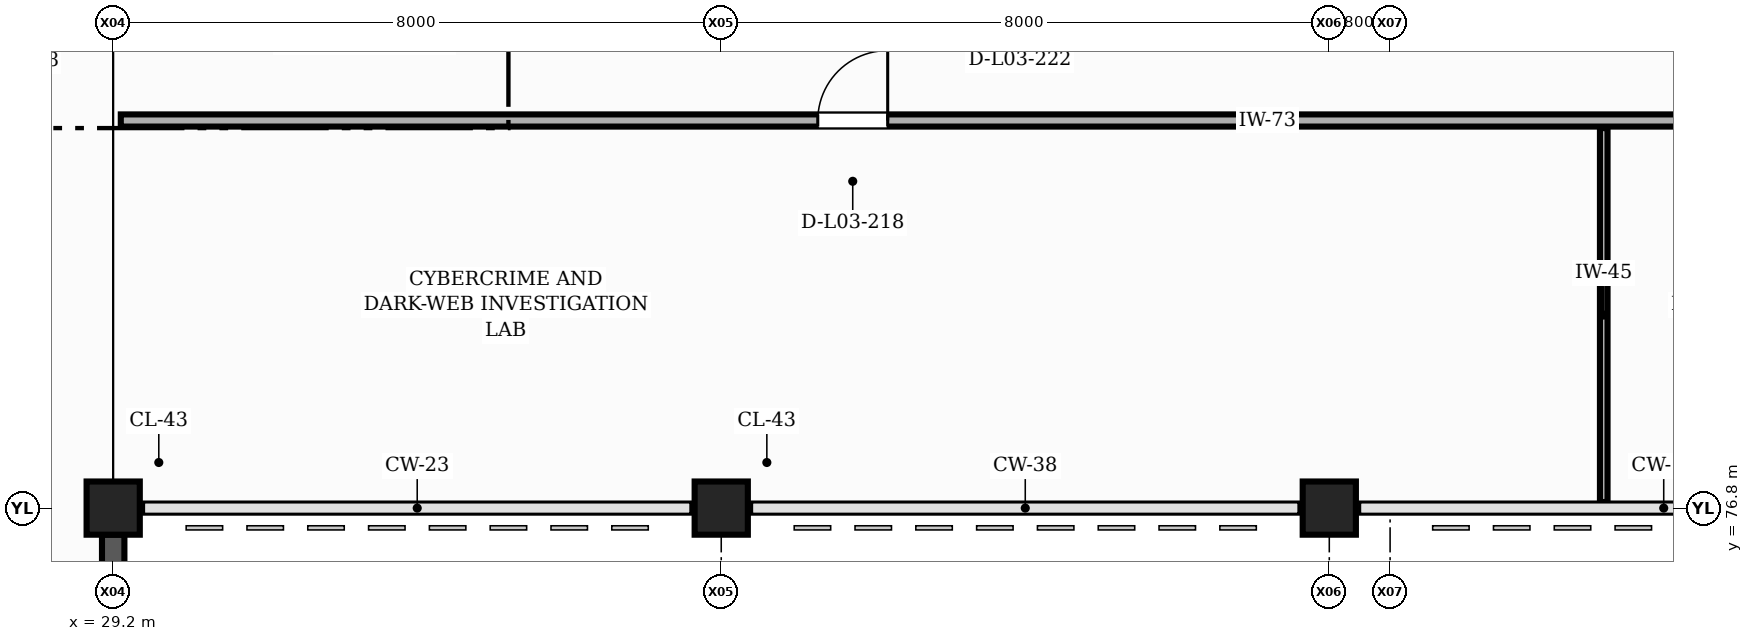
"""IFC4 building model, lengths in metres.
Left out: names, types, materials, properties, quantities, classifications, styles, units other than length and angle.
Written with IfcOpenShell. Run it as: python <this file> out.ifc"""

import sys

from ifc_helpers import new_model, si_unit, direction, frame, frame_2d, origin, origin_2d, place, context, subcontext, project, spatial, rectangle, extrude, element, fill, save


model = new_model("IFC4")
c1 = context("Model", 3, precision=1e-05, world=origin(), true_north=direction((0.0, 1.0)))
c2 = subcontext(c1, "Body", "Model", "MODEL_VIEW")
j1 = project(units=[si_unit("LENGTHUNIT", "METRE"), si_unit("PLANEANGLEUNIT", "RADIAN")], contexts=[c1])
p1 = place(None, origin())
s1 = spatial("IfcSite", under=j1, at=p1, CompositionType="ELEMENT")
p2 = place(p1, origin())
s2 = spatial("IfcBuilding", under=s1, at=p2, CompositionType="ELEMENT")
p3 = place(p2, frame((0.0, 0.0, 13.5)))
s3 = spatial("IfcBuildingStorey", under=s2, at=p3, CompositionType="ELEMENT", Elevation=13.5)
for number, where, z_axis, x_axis in (
    (1, (29.2, 76.8, 0.0), (0.0, 0.0, 1.0), (1.0, 0.0, 0.0)),
    (2, (37.2, 76.8, 0.0), (0.0, 0.0, 1.0), (1.0, 0.0, 0.0)),
    (3, (45.2, 76.8, 0.0), (0.0, 0.0, 1.0), (1.0, 0.0, 0.0)),
):
    element("IfcColumn", number, at=place(p3, frame(where, z_axis=z_axis, x_axis=x_axis)), inside=s3, PredefinedType="COLUMN", context=c2, shape_type="SweptSolid", body=[
        extrude(rectangle(XDim=0.7, YDim=0.7, at=origin_2d()), origin(), (0.0, 0.0, 1.0), 4.5),
    ])
p4 = place(p3, frame((29.2, 69.125, 0.0), z_axis=(0.0, 0.0, 1.0), x_axis=(0.0, 1.0, 0.0)))
e4 = element("IfcWall", 4, at=p4, inside=s3, PredefinedType="SOLIDWALL", context=c2, shape_type="SweptSolid", body=[
    extrude(rectangle(XDim=7.325, YDim=0.295, at=frame_2d((3.663, 0.0))), origin(), (0.0, 0.0, 1.0), 3.54),
])
p5 = place(p4, frame((2.262, 0.0, 0.9)))
e5 = element("IfcOpeningElement", 5, at=p5, cuts=e4, PredefinedType="OPENING", context=c2, shape_type="SweptSolid", body=[
    extrude(rectangle(XDim=2.8, YDim=1.8, at=frame_2d((1.4, 0.9))), frame((0.0, 0.157, 0.0), z_axis=(0.0, -1.0, 0.0), x_axis=(1.0, 0.0, 0.0)), (0.0, 0.0, 1.0), 0.315),
])
p6 = place(p3, frame((48.811, 76.88, 0.0), z_axis=(0.0, 0.0, 1.0), x_axis=(0.0, 1.0, 0.0)))
e6 = element("IfcWall", 6, at=p6, inside=s3, PredefinedType="PARTITIONING", context=c2, shape_type="SweptSolid", body=[
    extrude(rectangle(XDim=4.92, YDim=0.1, at=frame_2d((2.46, 0.0))), origin(), (0.0, 0.0, 1.0), 4.19),
])
p7 = place(p3, frame((29.3, 81.9, 0.0), z_axis=(0.0, 0.0, 1.0), x_axis=(1.0, 0.0, 0.0)))
e7 = element("IfcWall", 7, at=p7, inside=s3, PredefinedType="PARTITIONING", context=c2, shape_type="SweptSolid", body=[
    extrude(rectangle(XDim=64.62, YDim=0.16, at=frame_2d((32.31, 0.0))), origin(), (0.0, 0.0, 1.0), 3.525),
])
p8 = place(p7, frame((9.17, 0.0, 0.0)))
e8 = element("IfcOpeningElement", 8, at=p8, cuts=e7, PredefinedType="OPENING", context=c2, shape_type="SweptSolid", body=[
    extrude(rectangle(XDim=0.92, YDim=2.1, at=frame_2d((0.46, 1.05))), frame((0.0, 0.09, 0.0), z_axis=(0.0, -1.0, 0.0), x_axis=(1.0, 0.0, 0.0)), (0.0, 0.0, 1.0), 0.18),
])
p9 = place(p7, frame((27.4, 0.0, 0.0)))
e9 = element("IfcOpeningElement", 9, at=p9, cuts=e7, PredefinedType="OPENING", context=c2, shape_type="SweptSolid", body=[
    extrude(rectangle(XDim=0.95, YDim=2.1, at=frame_2d((0.475, 1.05))), frame((0.0, 0.09, 0.0), z_axis=(0.0, -1.0, 0.0), x_axis=(1.0, 0.0, 0.0)), (0.0, 0.0, 1.0), 0.18),
])
p10 = place(p7, frame((43.18, 0.0, 0.0)))
e10 = element("IfcOpeningElement", 10, at=p10, cuts=e7, PredefinedType="OPENING", context=c2, shape_type="SweptSolid", body=[
    extrude(rectangle(XDim=0.98, YDim=2.12, at=frame_2d((0.49, 1.06))), frame((0.0, 0.09, 0.0), z_axis=(0.0, -1.0, 0.0), x_axis=(1.0, 0.0, 0.0)), (0.0, 0.0, 1.0), 0.18),
])
p11 = place(p7, frame((57.17, 0.0, 0.0)))
e11 = element("IfcOpeningElement", 11, at=p11, cuts=e7, PredefinedType="OPENING", context=c2, shape_type="SweptSolid", body=[
    extrude(rectangle(XDim=1.0, YDim=2.1, at=frame_2d((0.5, 1.05))), frame((0.0, 0.09, 0.0), z_axis=(0.0, -1.0, 0.0), x_axis=(1.0, 0.0, 0.0)), (0.0, 0.0, 1.0), 0.18),
])
p12 = place(p8, origin())
e12 = element("IfcDoor", 12, at=p12, inside=s3, OperationType="SINGLE_SWING_RIGHT", PredefinedType="DOOR", context=c2, shape_type="SweptSolid", body=[
    extrude(rectangle(XDim=0.92, YDim=2.1, at=frame_2d((0.46, 1.05))), frame((0.0, 0.025, 0.0), z_axis=(0.0, -1.0, 0.0), x_axis=(1.0, 0.0, 0.0)), (0.0, 0.0, 1.0), 0.05),
])
fill(e8, e12)
save(model, sys.argv[1])
